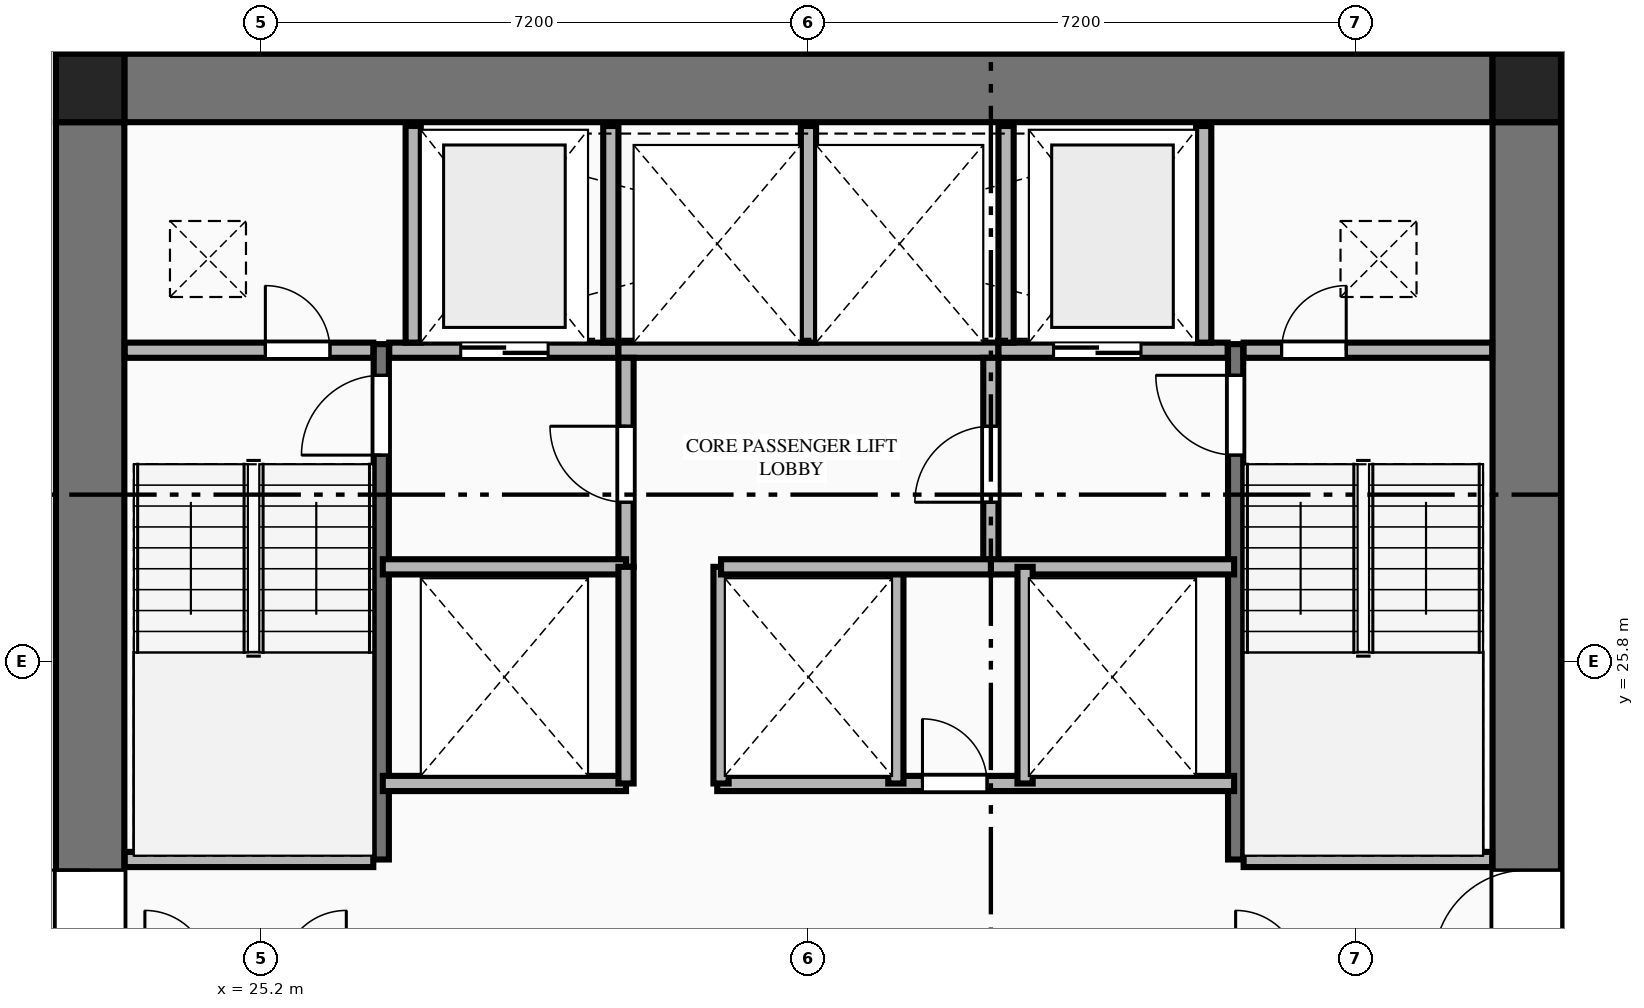
"""IFC4 building model, lengths in metres.
Left out: names, types, materials, properties, quantities, classifications, styles, units other than length and angle.
Written with IfcOpenShell. Run it as: python <this file> out.ifc"""

import sys

from ifc_helpers import new_model, si_unit, direction, frame, frame_2d, origin, origin_2d, place, context, subcontext, project, spatial, rectangle, extrude, element, fill, save


model = new_model("IFC4")
c1 = context("Model", 3, precision=1e-05, world=origin(), true_north=direction((0.0, 1.0)))
c2 = subcontext(c1, "Body", "Model", "MODEL_VIEW")
j1 = project(units=[si_unit("LENGTHUNIT", "METRE"), si_unit("PLANEANGLEUNIT", "RADIAN")], contexts=[c1])
p1 = place(None, origin())
s1 = spatial("IfcSite", under=j1, at=p1, CompositionType="ELEMENT")
p2 = place(p1, origin())
s2 = spatial("IfcBuilding", under=s1, at=p2, CompositionType="ELEMENT")
p3 = place(p2, frame((0.0, 0.0, 42.65)))
s3 = spatial("IfcBuildingStorey", under=s2, at=p3, CompositionType="ELEMENT", Elevation=42.65)
for number, where, z_axis, x_axis in (
    (1, (41.85, 33.35, 0.0), (0.0, 0.0, 1.0), (1.0, 0.0, 0.0)),
    (2, (22.95, 33.35, 0.0), (0.0, 0.0, 1.0), (1.0, 0.0, 0.0)),
):
    element("IfcColumn", number, at=place(p3, frame(where, z_axis=z_axis, x_axis=x_axis)), inside=s3, PredefinedType="COLUMN", context=c2, shape_type="SweptSolid", body=[
        extrude(rectangle(XDim=0.9, YDim=0.9, at=origin_2d()), origin(), (0.0, 0.0, 1.0), 3.55),
    ])
p4 = place(p3, frame((23.4, 33.35, 0.0), z_axis=(0.0, 0.0, 1.0), x_axis=(1.0, 0.0, 0.0)))
e3 = element("IfcWall", 3, at=p4, inside=s3, PredefinedType="SHEAR", context=c2, shape_type="SweptSolid", body=[
    extrude(rectangle(XDim=18.0, YDim=0.9, at=frame_2d((9.0, 0.0))), origin(), (0.0, 0.0, 1.0), 3.33),
])
p5 = place(p3, frame((22.95, 18.9, 0.0), z_axis=(0.0, 0.0, 1.0), x_axis=(0.0, 1.0, 0.0)))
e4 = element("IfcWall", 4, at=p5, inside=s3, PredefinedType="SHEAR", context=c2, shape_type="SweptSolid", body=[
    extrude(rectangle(XDim=14.0, YDim=0.9, at=frame_2d((7.0, 0.0))), origin(), (0.0, 0.0, 1.0), 3.33),
])
p6 = place(p5, frame((2.94, 0.0, 0.0)))
e5 = element("IfcOpeningElement", 5, at=p6, cuts=e4, PredefinedType="OPENING", context=c2, shape_type="SweptSolid", body=[
    extrude(rectangle(XDim=1.22, YDim=2.25, at=frame_2d((0.61, 1.125))), frame((0.0, 0.46, 0.0), z_axis=(0.0, -1.0, 0.0), x_axis=(1.0, 0.0, 0.0)), (0.0, 0.0, 1.0), 0.92),
])
p7 = place(p3, frame((41.85, 18.9, 0.0), z_axis=(0.0, 0.0, 1.0), x_axis=(0.0, 1.0, 0.0)))
e6 = element("IfcWall", 6, at=p7, inside=s3, PredefinedType="SHEAR", context=c2, shape_type="SweptSolid", body=[
    extrude(rectangle(XDim=14.0, YDim=0.9, at=frame_2d((7.0, 0.0))), origin(), (0.0, 0.0, 1.0), 3.33),
])
p8 = place(p7, frame((2.94, 0.0, 0.0)))
e7 = element("IfcOpeningElement", 7, at=p8, cuts=e6, PredefinedType="OPENING", context=c2, shape_type="SweptSolid", body=[
    extrude(rectangle(XDim=1.22, YDim=2.25, at=frame_2d((0.61, 1.125))), frame((0.0, 0.46, 0.0), z_axis=(0.0, -1.0, 0.0), x_axis=(1.0, 0.0, 0.0)), (0.0, 0.0, 1.0), 0.92),
])
p9 = place(p3, frame((26.78, 23.2, 0.0), z_axis=(0.0, 0.0, 1.0), x_axis=(0.0, 1.0, 0.0)))
e8 = element("IfcWall", 8, at=p9, inside=s3, PredefinedType="SHEAR", context=c2, shape_type="SweptSolid", body=[
    extrude(rectangle(XDim=6.78, YDim=0.2, at=frame_2d((3.39, 0.0))), origin(), (0.0, 0.0, 1.0), 3.55),
])
p10 = place(p9, frame((5.32, 0.0, 0.0)))
e9 = element("IfcOpeningElement", 9, at=p10, cuts=e8, PredefinedType="OPENING", context=c2, shape_type="SweptSolid", body=[
    extrude(rectangle(XDim=1.05, YDim=2.15, at=frame_2d((0.525, 1.075))), frame((0.0, 0.11, 0.0), z_axis=(0.0, -1.0, 0.0), x_axis=(1.0, 0.0, 0.0)), (0.0, 0.0, 1.0), 0.22),
])
p11 = place(p3, frame((23.405, 23.2, 0.0), z_axis=(0.0, 0.0, 1.0), x_axis=(1.0, 0.0, 0.0)))
e10 = element("IfcWall", 10, at=p11, inside=s3, PredefinedType="PLUMBINGWALL", context=c2, shape_type="SweptSolid", body=[
    extrude(rectangle(XDim=3.27, YDim=0.2, at=frame_2d((1.635, 0.0))), origin(), (0.0, 0.0, 1.0), 3.33),
])
p12 = place(p3, frame((38.02, 23.2, 0.0), z_axis=(0.0, 0.0, 1.0), x_axis=(0.0, 1.0, 0.0)))
e11 = element("IfcWall", 11, at=p12, inside=s3, PredefinedType="SHEAR", context=c2, shape_type="SweptSolid", body=[
    extrude(rectangle(XDim=6.78, YDim=0.2, at=frame_2d((3.39, 0.0))), origin(), (0.0, 0.0, 1.0), 3.55),
])
p13 = place(p12, frame((5.32, 0.0, 0.0)))
e12 = element("IfcOpeningElement", 12, at=p13, cuts=e11, PredefinedType="OPENING", context=c2, shape_type="SweptSolid", body=[
    extrude(rectangle(XDim=1.05, YDim=2.15, at=frame_2d((0.525, 1.075))), frame((0.0, 0.11, 0.0), z_axis=(0.0, -1.0, 0.0), x_axis=(1.0, 0.0, 0.0)), (0.0, 0.0, 1.0), 0.22),
])
p14 = place(p3, frame((38.125, 23.2, 0.0), z_axis=(0.0, 0.0, 1.0), x_axis=(1.0, 0.0, 0.0)))
e13 = element("IfcWall", 13, at=p14, inside=s3, PredefinedType="PLUMBINGWALL", context=c2, shape_type="SweptSolid", body=[
    extrude(rectangle(XDim=3.27, YDim=0.2, at=frame_2d((1.635, 0.0))), origin(), (0.0, 0.0, 1.0), 3.33),
])
p15 = place(p3, frame((23.405, 29.9, 0.0), z_axis=(0.0, 0.0, 1.0), x_axis=(1.0, 0.0, 0.0)))
e14 = element("IfcWall", 14, at=p15, inside=s3, PredefinedType="PLUMBINGWALL", context=c2, shape_type="SweptSolid", body=[
    extrude(rectangle(XDim=3.27, YDim=0.2, at=frame_2d((1.635, 0.0))), origin(), (0.0, 0.0, 1.0), 3.33),
])
p16 = place(p15, frame((1.85, 0.0, 0.0)))
e15 = element("IfcOpeningElement", 15, at=p16, cuts=e14, PredefinedType="OPENING", context=c2, shape_type="SweptSolid", body=[
    extrude(rectangle(XDim=0.85, YDim=2.05, at=frame_2d((0.425, 1.025))), frame((0.0, 0.11, 0.0), z_axis=(0.0, -1.0, 0.0), x_axis=(1.0, 0.0, 0.0)), (0.0, 0.0, 1.0), 0.22),
])
p17 = place(p3, frame((26.885, 29.9, 0.0), z_axis=(0.0, 0.0, 1.0), x_axis=(1.0, 0.0, 0.0)))
e16 = element("IfcWall", 16, at=p17, inside=s3, PredefinedType="PLUMBINGWALL", context=c2, shape_type="SweptSolid", body=[
    extrude(rectangle(XDim=3.015, YDim=0.2, at=frame_2d((1.507, 0.0))), origin(), (0.0, 0.0, 1.0), 3.33),
])
p18 = place(p17, frame((0.94, 0.0, 0.0)))
e17 = element("IfcOpeningElement", 17, at=p18, cuts=e16, PredefinedType="OPENING", context=c2, shape_type="SweptSolid", body=[
    extrude(rectangle(XDim=1.15, YDim=2.2, at=frame_2d((0.575, 1.1))), frame((0.0, 0.11, 0.0), z_axis=(0.0, -1.0, 0.0), x_axis=(1.0, 0.0, 0.0)), (0.0, 0.0, 1.0), 0.22),
])
p19 = place(p3, frame((29.9, 29.9, 0.0), z_axis=(0.0, 0.0, 1.0), x_axis=(1.0, 0.0, 0.0)))
e18 = element("IfcWall", 18, at=p19, inside=s3, PredefinedType="PLUMBINGWALL", context=c2, shape_type="SweptSolid", body=[
    extrude(rectangle(XDim=5.0, YDim=0.2, at=frame_2d((2.5, 0.0))), origin(), (0.0, 0.0, 1.0), 3.33),
])
p20 = place(p3, frame((34.9, 29.9, 0.0), z_axis=(0.0, 0.0, 1.0), x_axis=(1.0, 0.0, 0.0)))
e19 = element("IfcWall", 19, at=p20, inside=s3, PredefinedType="PLUMBINGWALL", context=c2, shape_type="SweptSolid", body=[
    extrude(rectangle(XDim=3.015, YDim=0.2, at=frame_2d((1.508, 0.0))), origin(), (0.0, 0.0, 1.0), 3.33),
])
p21 = place(p20, frame((0.725, 0.0, 0.0)))
e20 = element("IfcOpeningElement", 20, at=p21, cuts=e19, PredefinedType="OPENING", context=c2, shape_type="SweptSolid", body=[
    extrude(rectangle(XDim=1.15, YDim=2.2, at=frame_2d((0.575, 1.1))), frame((0.0, 0.11, 0.0), z_axis=(0.0, -1.0, 0.0), x_axis=(1.0, 0.0, 0.0)), (0.0, 0.0, 1.0), 0.22),
])
p22 = place(p3, frame((38.125, 29.9, 0.0), z_axis=(0.0, 0.0, 1.0), x_axis=(1.0, 0.0, 0.0)))
e21 = element("IfcWall", 21, at=p22, inside=s3, PredefinedType="PLUMBINGWALL", context=c2, shape_type="SweptSolid", body=[
    extrude(rectangle(XDim=3.27, YDim=0.2, at=frame_2d((1.635, 0.0))), origin(), (0.0, 0.0, 1.0), 3.33),
])
p23 = place(p22, frame((0.5, 0.0, 0.0)))
e22 = element("IfcOpeningElement", 22, at=p23, cuts=e21, PredefinedType="OPENING", context=c2, shape_type="SweptSolid", body=[
    extrude(rectangle(XDim=0.85, YDim=2.05, at=frame_2d((0.425, 1.025))), frame((0.0, 0.11, 0.0), z_axis=(0.0, -1.0, 0.0), x_axis=(1.0, 0.0, 0.0)), (0.0, 0.0, 1.0), 0.22),
])
for number, where, z_axis, x_axis in (
    (23, (27.2, 30.0, 0.0), (0.0, 0.0, 1.0), (0.0, 1.0, 0.0)),
    (24, (29.8, 30.0, 0.0), (0.0, 0.0, 1.0), (0.0, 1.0, 0.0)),
    (25, (32.4, 30.0, 0.0), (0.0, 0.0, 1.0), (0.0, 1.0, 0.0)),
    (26, (35.0, 30.0, 0.0), (0.0, 0.0, 1.0), (0.0, 1.0, 0.0)),
    (27, (37.6, 30.0, 0.0), (0.0, 0.0, 1.0), (0.0, 1.0, 0.0)),
):
    element("IfcWall", number, at=place(p3, frame(where, z_axis=z_axis, x_axis=x_axis)), inside=s3, PredefinedType="PLUMBINGWALL", context=c2, shape_type="SweptSolid", body=[
        extrude(rectangle(XDim=2.85, YDim=0.2, at=frame_2d((1.425, 0.0))), origin(), (0.0, 0.0, 1.0), 3.33),
    ])
p24 = place(p3, frame((30.0, 27.05, 0.0), z_axis=(0.0, 0.0, 1.0), x_axis=(0.0, 1.0, 0.0)))
e28 = element("IfcWall", 28, at=p24, inside=s3, PredefinedType="PLUMBINGWALL", context=c2, shape_type="SweptSolid", body=[
    extrude(rectangle(XDim=2.75, YDim=0.2, at=frame_2d((1.375, 0.0))), origin(), (0.0, 0.0, 1.0), 3.33),
])
p25 = place(p24, frame((0.85, 0.0, 0.0)))
e29 = element("IfcOpeningElement", 29, at=p25, cuts=e28, PredefinedType="OPENING", context=c2, shape_type="SweptSolid", body=[
    extrude(rectangle(XDim=1.0, YDim=2.15, at=frame_2d((0.5, 1.075))), frame((0.0, 0.11, 0.0), z_axis=(0.0, -1.0, 0.0), x_axis=(1.0, 0.0, 0.0)), (0.0, 0.0, 1.0), 0.22),
])
p26 = place(p3, frame((26.8, 27.05, 0.0), z_axis=(0.0, 0.0, 1.0), x_axis=(1.0, 0.0, 0.0)))
e30 = element("IfcWall", 30, at=p26, inside=s3, PredefinedType="PLUMBINGWALL", context=c2, shape_type="SweptSolid", body=[
    extrude(rectangle(XDim=3.2, YDim=0.2, at=frame_2d((1.6, 0.0))), origin(), (0.0, 0.0, 1.0), 3.33),
])
p27 = place(p3, frame((34.8, 27.05, 0.0), z_axis=(0.0, 0.0, 1.0), x_axis=(0.0, 1.0, 0.0)))
e31 = element("IfcWall", 31, at=p27, inside=s3, PredefinedType="PLUMBINGWALL", context=c2, shape_type="SweptSolid", body=[
    extrude(rectangle(XDim=2.75, YDim=0.2, at=frame_2d((1.375, 0.0))), origin(), (0.0, 0.0, 1.0), 3.33),
])
p28 = place(p27, frame((0.85, 0.0, 0.0)))
e32 = element("IfcOpeningElement", 32, at=p28, cuts=e31, PredefinedType="OPENING", context=c2, shape_type="SweptSolid", body=[
    extrude(rectangle(XDim=1.0, YDim=2.15, at=frame_2d((0.5, 1.075))), frame((0.0, 0.11, 0.0), z_axis=(0.0, -1.0, 0.0), x_axis=(1.0, 0.0, 0.0)), (0.0, 0.0, 1.0), 0.22),
])
for number, where, z_axis, x_axis in (
    (33, (34.8, 27.05, 0.0), (0.0, 0.0, 1.0), (1.0, 0.0, 0.0)),
    (34, (26.8, 24.2, 0.0), (0.0, 0.0, 1.0), (1.0, 0.0, 0.0)),
):
    element("IfcWall", number, at=place(p3, frame(where, z_axis=z_axis, x_axis=x_axis)), inside=s3, PredefinedType="PLUMBINGWALL", context=c2, shape_type="SweptSolid", body=[
        extrude(rectangle(XDim=3.2, YDim=0.2, at=frame_2d((1.6, 0.0))), origin(), (0.0, 0.0, 1.0), 3.33),
    ])
p29 = place(p3, frame((30.0, 24.2, 0.0), z_axis=(0.0, 0.0, 1.0), x_axis=(0.0, 1.0, 0.0)))
e35 = element("IfcWall", 35, at=p29, inside=s3, PredefinedType="PLUMBINGWALL", context=c2, shape_type="SweptSolid", body=[
    extrude(rectangle(XDim=2.85, YDim=0.2, at=frame_2d((1.425, 0.0))), origin(), (0.0, 0.0, 1.0), 3.33),
])
p30 = place(p3, frame((31.2, 24.2, 0.0), z_axis=(0.0, 0.0, 1.0), x_axis=(1.0, 0.0, 0.0)))
e36 = element("IfcWall", 36, at=p30, inside=s3, PredefinedType="PLUMBINGWALL", context=c2, shape_type="SweptSolid", body=[
    extrude(rectangle(XDim=6.8, YDim=0.2, at=frame_2d((3.4, 0.0))), origin(), (0.0, 0.0, 1.0), 3.33),
])
p31 = place(p30, frame((2.7, 0.0, 0.0)))
e37 = element("IfcOpeningElement", 37, at=p31, cuts=e36, PredefinedType="OPENING", context=c2, shape_type="SweptSolid", body=[
    extrude(rectangle(XDim=0.85, YDim=2.05, at=frame_2d((0.425, 1.025))), frame((0.0, 0.11, 0.0), z_axis=(0.0, -1.0, 0.0), x_axis=(1.0, 0.0, 0.0)), (0.0, 0.0, 1.0), 0.22),
])
for number, where, z_axis, x_axis in (
    (38, (31.25, 24.2, 0.0), (0.0, 0.0, 1.0), (0.0, 1.0, 0.0)),
    (39, (33.55, 24.2, 0.0), (0.0, 0.0, 1.0), (0.0, 1.0, 0.0)),
    (40, (35.25, 24.2, 0.0), (0.0, 0.0, 1.0), (0.0, 1.0, 0.0)),
):
    element("IfcWall", number, at=place(p3, frame(where, z_axis=z_axis, x_axis=x_axis)), inside=s3, PredefinedType="PLUMBINGWALL", context=c2, shape_type="SweptSolid", body=[
        extrude(rectangle(XDim=2.85, YDim=0.2, at=frame_2d((1.425, 0.0))), origin(), (0.0, 0.0, 1.0), 3.33),
    ])
p32 = place(p3, frame((31.25, 27.05, 0.0), z_axis=(0.0, 0.0, 1.0), x_axis=(1.0, 0.0, 0.0)))
e41 = element("IfcWall", 41, at=p32, inside=s3, PredefinedType="PLUMBINGWALL", context=c2, shape_type="SweptSolid", body=[
    extrude(rectangle(XDim=3.55, YDim=0.2, at=frame_2d((1.775, 0.0))), origin(), (0.0, 0.0, 1.0), 3.33),
])
p33 = place(p6, origin())
e42 = element("IfcDoor", 42, at=p33, inside=s3, OperationType="SINGLE_SWING_RIGHT", PredefinedType="DOOR", context=c2, shape_type="SweptSolid", body=[
    extrude(rectangle(XDim=1.22, YDim=2.25, at=frame_2d((0.61, 1.125))), frame((0.0, 0.025, 0.0), z_axis=(0.0, -1.0, 0.0), x_axis=(1.0, 0.0, 0.0)), (0.0, 0.0, 1.0), 0.05),
])
fill(e5, e42)
p34 = place(p8, origin())
e43 = element("IfcDoor", 43, at=p34, inside=s3, OperationType="SINGLE_SWING_LEFT", PredefinedType="DOOR", context=c2, shape_type="SweptSolid", body=[
    extrude(rectangle(XDim=1.22, YDim=2.25, at=frame_2d((0.61, 1.125))), frame((0.0, 0.025, 0.0), z_axis=(0.0, -1.0, 0.0), x_axis=(1.0, 0.0, 0.0)), (0.0, 0.0, 1.0), 0.05),
])
fill(e7, e43)
p35 = place(p10, origin())
e44 = element("IfcDoor", 44, at=p35, inside=s3, OperationType="SINGLE_SWING_LEFT", PredefinedType="DOOR", context=c2, shape_type="SweptSolid", body=[
    extrude(rectangle(XDim=1.05, YDim=2.15, at=frame_2d((0.525, 1.075))), frame((0.0, 0.025, 0.0), z_axis=(0.0, -1.0, 0.0), x_axis=(1.0, 0.0, 0.0)), (0.0, 0.0, 1.0), 0.05),
])
fill(e9, e44)
p36 = place(p13, origin())
e45 = element("IfcDoor", 45, at=p36, inside=s3, OperationType="SINGLE_SWING_RIGHT", PredefinedType="DOOR", context=c2, shape_type="SweptSolid", body=[
    extrude(rectangle(XDim=1.05, YDim=2.15, at=frame_2d((0.525, 1.075))), frame((0.0, 0.025, 0.0), z_axis=(0.0, -1.0, 0.0), x_axis=(1.0, 0.0, 0.0)), (0.0, 0.0, 1.0), 0.05),
])
fill(e12, e45)
p37 = place(p16, origin())
e46 = element("IfcDoor", 46, at=p37, inside=s3, OperationType="SINGLE_SWING_LEFT", PredefinedType="DOOR", context=c2, shape_type="SweptSolid", body=[
    extrude(rectangle(XDim=0.85, YDim=2.05, at=frame_2d((0.425, 1.025))), frame((0.0, 0.025, 0.0), z_axis=(0.0, -1.0, 0.0), x_axis=(1.0, 0.0, 0.0)), (0.0, 0.0, 1.0), 0.05),
])
fill(e15, e46)
p38 = place(p23, origin())
e47 = element("IfcDoor", 47, at=p38, inside=s3, OperationType="SINGLE_SWING_RIGHT", PredefinedType="DOOR", context=c2, shape_type="SweptSolid", body=[
    extrude(rectangle(XDim=0.85, YDim=2.05, at=frame_2d((0.425, 1.025))), frame((0.0, 0.025, 0.0), z_axis=(0.0, -1.0, 0.0), x_axis=(1.0, 0.0, 0.0)), (0.0, 0.0, 1.0), 0.05),
])
fill(e22, e47)
p39 = place(p18, origin())
e48 = element("IfcDoor", 48, at=p39, inside=s3, OperationType="DOUBLE_DOOR_SLIDING", PredefinedType="DOOR", context=c2, shape_type="SweptSolid", body=[
    extrude(rectangle(XDim=1.15, YDim=2.2, at=frame_2d((0.575, 1.1))), frame((0.0, 0.025, 0.0), z_axis=(0.0, -1.0, 0.0), x_axis=(1.0, 0.0, 0.0)), (0.0, 0.0, 1.0), 0.05),
])
fill(e17, e48)
p40 = place(p21, origin())
e49 = element("IfcDoor", 49, at=p40, inside=s3, OperationType="DOUBLE_DOOR_SLIDING", PredefinedType="DOOR", context=c2, shape_type="SweptSolid", body=[
    extrude(rectangle(XDim=1.15, YDim=2.2, at=frame_2d((0.575, 1.1))), frame((0.0, 0.025, 0.0), z_axis=(0.0, -1.0, 0.0), x_axis=(1.0, 0.0, 0.0)), (0.0, 0.0, 1.0), 0.05),
])
fill(e20, e49)
p41 = place(p25, origin())
e50 = element("IfcDoor", 50, at=p41, inside=s3, OperationType="SINGLE_SWING_RIGHT", PredefinedType="DOOR", context=c2, shape_type="SweptSolid", body=[
    extrude(rectangle(XDim=1.0, YDim=2.15, at=frame_2d((0.5, 1.075))), frame((0.0, 0.025, 0.0), z_axis=(0.0, -1.0, 0.0), x_axis=(1.0, 0.0, 0.0)), (0.0, 0.0, 1.0), 0.05),
])
fill(e29, e50)
p42 = place(p28, origin())
e51 = element("IfcDoor", 51, at=p42, inside=s3, OperationType="SINGLE_SWING_LEFT", PredefinedType="DOOR", context=c2, shape_type="SweptSolid", body=[
    extrude(rectangle(XDim=1.0, YDim=2.15, at=frame_2d((0.5, 1.075))), frame((0.0, 0.025, 0.0), z_axis=(0.0, -1.0, 0.0), x_axis=(1.0, 0.0, 0.0)), (0.0, 0.0, 1.0), 0.05),
])
fill(e32, e51)
p43 = place(p31, origin())
e52 = element("IfcDoor", 52, at=p43, inside=s3, OperationType="SINGLE_SWING_LEFT", PredefinedType="DOOR", context=c2, shape_type="SweptSolid", body=[
    extrude(rectangle(XDim=0.85, YDim=2.05, at=frame_2d((0.425, 1.025))), frame((0.0, 0.025, 0.0), z_axis=(0.0, -1.0, 0.0), x_axis=(1.0, 0.0, 0.0)), (0.0, 0.0, 1.0), 0.05),
])
fill(e37, e52)
save(model, sys.argv[1])
